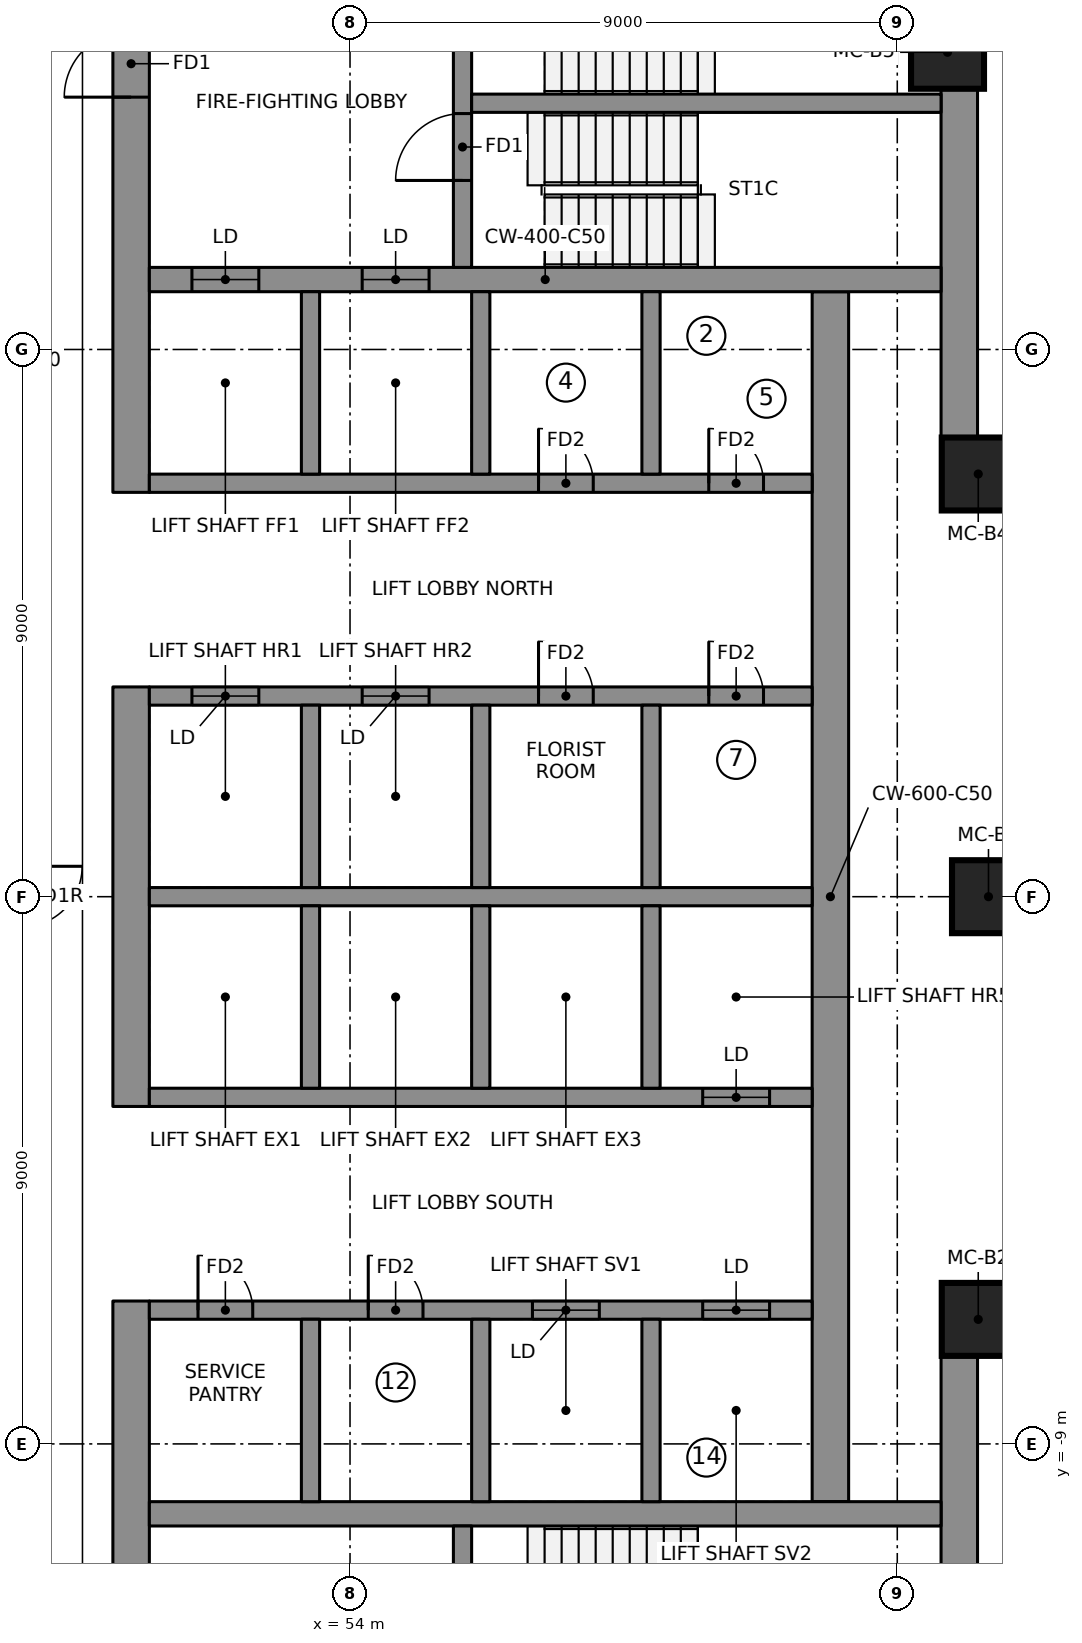
"""IFC4 building model, lengths in metres.
Left out: names, types, materials, properties, quantities, classifications, styles, units other than length and angle.
Written with IfcOpenShell. Run it as: python <this file> out.ifc"""

import sys

from ifc_helpers import new_model, si_unit, direction, frame, frame_2d, origin, origin_2d, place, context, subcontext, project, spatial, rectangle, extrude, element, fill, save


model = new_model("IFC4")
c1 = context("Model", 3, precision=1e-05, world=origin(), true_north=direction((0.0, 1.0)))
c2 = subcontext(c1, "Body", "Model", "MODEL_VIEW")
j1 = project(units=[si_unit("LENGTHUNIT", "METRE"), si_unit("PLANEANGLEUNIT", "RADIAN")], contexts=[c1])
p1 = place(None, origin())
s1 = spatial("IfcSite", under=j1, at=p1, CompositionType="ELEMENT")
p2 = place(p1, origin())
s2 = spatial("IfcBuilding", under=s1, at=p2, CompositionType="ELEMENT")
p3 = place(p2, frame((0.0, 0.0, 242.1)))
s3 = spatial("IfcBuildingStorey", under=s2, at=p3, CompositionType="ELEMENT", Elevation=242.1)
p4 = place(p3, frame((50.4, 6.65, 0.0), z_axis=(0.0, 0.0, 1.0), x_axis=(0.0, 1.0, 0.0)))
e1 = element("IfcWall", 1, at=p4, inside=s3, PredefinedType="SHEAR", context=c2, shape_type="SweptSolid", body=[
    extrude(rectangle(XDim=9.7, YDim=0.6, at=frame_2d((4.85, 0.0))), origin(), (0.0, 0.0, 1.0), 3.55),
])
p5 = place(p4, frame((6.5, 0.0, 0.0)))
e2 = element("IfcOpeningElement", 2, at=p5, cuts=e1, PredefinedType="OPENING", context=c2, shape_type="SweptSolid", body=[
    extrude(rectangle(XDim=1.1, YDim=2.1, at=frame_2d((0.55, 1.05))), frame((0.0, 0.31, 0.0), z_axis=(0.0, -1.0, 0.0), x_axis=(1.0, 0.0, 0.0)), (0.0, 0.0, 1.0), 0.62),
])
p6 = place(p3, frame((50.4, -3.45, 0.0), z_axis=(0.0, 0.0, 1.0), x_axis=(0.0, 1.0, 0.0)))
e3 = element("IfcWall", 3, at=p6, inside=s3, PredefinedType="SHEAR", context=c2, shape_type="SweptSolid", body=[
    extrude(rectangle(XDim=6.9, YDim=0.6, at=frame_2d((3.45, 0.0))), origin(), (0.0, 0.0, 1.0), 3.55),
])
p7 = place(p3, frame((50.4, -16.35, 0.0), z_axis=(0.0, 0.0, 1.0), x_axis=(0.0, 1.0, 0.0)))
e4 = element("IfcWall", 4, at=p7, inside=s3, PredefinedType="SHEAR", context=c2, shape_type="SweptSolid", body=[
    extrude(rectangle(XDim=9.7, YDim=0.6, at=frame_2d((4.85, 0.0))), origin(), (0.0, 0.0, 1.0), 3.55),
])
p8 = place(p7, frame((2.1, 0.0, 0.0)))
e5 = element("IfcOpeningElement", 5, at=p8, cuts=e4, PredefinedType="OPENING", context=c2, shape_type="SweptSolid", body=[
    extrude(rectangle(XDim=1.1, YDim=2.1, at=frame_2d((0.55, 1.05))), frame((0.0, 0.31, 0.0), z_axis=(0.0, -1.0, 0.0), x_axis=(1.0, 0.0, 0.0)), (0.0, 0.0, 1.0), 0.62),
])
for number, where, z_axis, x_axis in (
    (6, (64.02, 7.502, 0.0), (0.0, 0.0, 1.0), (0.0, 1.0, 0.0)),
    (7, (64.02, -15.75, 0.0), (0.0, 0.0, 1.0), (0.0, 1.0, 0.0)),
):
    element("IfcWall", number, at=place(p3, frame(where, z_axis=z_axis, x_axis=x_axis)), inside=s3, PredefinedType="SHEAR", context=c2, shape_type="SweptSolid", body=[
        extrude(rectangle(XDim=8.248, YDim=0.6, at=frame_2d((4.124, 0.0))), origin(), (0.0, 0.0, 1.0), 3.55),
    ])
p9 = place(p3, frame((61.9, -9.95, 0.0), z_axis=(0.0, 0.0, 1.0), x_axis=(0.0, 1.0, 0.0)))
e8 = element("IfcWall", 8, at=p9, inside=s3, PredefinedType="SHEAR", context=c2, shape_type="SweptSolid", body=[
    extrude(rectangle(XDim=19.9, YDim=0.6, at=frame_2d((9.95, 0.0))), origin(), (0.0, 0.0, 1.0), 3.55),
])
p10 = place(p3, frame((50.7, 10.15, 0.0), z_axis=(0.0, 0.0, 1.0), x_axis=(1.0, 0.0, 0.0)))
e9 = element("IfcWall", 9, at=p10, inside=s3, PredefinedType="SHEAR", context=c2, shape_type="SweptSolid", body=[
    extrude(rectangle(XDim=13.02, YDim=0.4, at=frame_2d((6.51, 0.0))), origin(), (0.0, 0.0, 1.0), 3.55),
])
p11 = place(p10, frame((0.7, 0.0, 0.0)))
e10 = element("IfcOpeningElement", 10, at=p11, cuts=e9, PredefinedType="OPENING", context=c2, shape_type="SweptSolid", body=[
    extrude(rectangle(XDim=1.1, YDim=2.1, at=frame_2d((0.55, 1.05))), frame((0.0, 0.21, 0.0), z_axis=(0.0, -1.0, 0.0), x_axis=(1.0, 0.0, 0.0)), (0.0, 0.0, 1.0), 0.42),
])
p12 = place(p10, frame((3.5, 0.0, 0.0)))
e11 = element("IfcOpeningElement", 11, at=p12, cuts=e9, PredefinedType="OPENING", context=c2, shape_type="SweptSolid", body=[
    extrude(rectangle(XDim=1.1, YDim=2.1, at=frame_2d((0.55, 1.05))), frame((0.0, 0.21, 0.0), z_axis=(0.0, -1.0, 0.0), x_axis=(1.0, 0.0, 0.0)), (0.0, 0.0, 1.0), 0.42),
])
p13 = place(p3, frame((50.7, -10.15, 0.0), z_axis=(0.0, 0.0, 1.0), x_axis=(1.0, 0.0, 0.0)))
e12 = element("IfcWall", 12, at=p13, inside=s3, PredefinedType="SHEAR", context=c2, shape_type="SweptSolid", body=[
    extrude(rectangle(XDim=13.02, YDim=0.4, at=frame_2d((6.51, 0.0))), origin(), (0.0, 0.0, 1.0), 3.55),
])
p14 = place(p3, frame((50.7, 0.0, 0.0), z_axis=(0.0, 0.0, 1.0), x_axis=(1.0, 0.0, 0.0)))
e13 = element("IfcWall", 13, at=p14, inside=s3, PredefinedType="SHEAR", context=c2, shape_type="SweptSolid", body=[
    extrude(rectangle(XDim=10.9, YDim=0.3, at=frame_2d((5.45, 0.0))), origin(), (0.0, 0.0, 1.0), 3.55),
])
p15 = place(p3, frame((50.7, 3.3, 0.0), z_axis=(0.0, 0.0, 1.0), x_axis=(1.0, 0.0, 0.0)))
e14 = element("IfcWall", 14, at=p15, inside=s3, PredefinedType="SHEAR", context=c2, shape_type="SweptSolid", body=[
    extrude(rectangle(XDim=10.9, YDim=0.3, at=frame_2d((5.45, 0.0))), origin(), (0.0, 0.0, 1.0), 3.55),
])
p16 = place(p15, frame((0.7, 0.0, 0.0)))
e15 = element("IfcOpeningElement", 15, at=p16, cuts=e14, PredefinedType="OPENING", context=c2, shape_type="SweptSolid", body=[
    extrude(rectangle(XDim=1.1, YDim=2.1, at=frame_2d((0.55, 1.05))), frame((0.0, 0.16, 0.0), z_axis=(0.0, -1.0, 0.0), x_axis=(1.0, 0.0, 0.0)), (0.0, 0.0, 1.0), 0.32),
])
p17 = place(p15, frame((3.5, 0.0, 0.0)))
e16 = element("IfcOpeningElement", 16, at=p17, cuts=e14, PredefinedType="OPENING", context=c2, shape_type="SweptSolid", body=[
    extrude(rectangle(XDim=1.1, YDim=2.1, at=frame_2d((0.55, 1.05))), frame((0.0, 0.16, 0.0), z_axis=(0.0, -1.0, 0.0), x_axis=(1.0, 0.0, 0.0)), (0.0, 0.0, 1.0), 0.32),
])
p18 = place(p15, frame((6.4, 0.0, 0.0)))
e17 = element("IfcOpeningElement", 17, at=p18, cuts=e14, PredefinedType="OPENING", context=c2, shape_type="SweptSolid", body=[
    extrude(rectangle(XDim=0.9, YDim=2.1, at=frame_2d((0.45, 1.05))), frame((0.0, 0.16, 0.0), z_axis=(0.0, -1.0, 0.0), x_axis=(1.0, 0.0, 0.0)), (0.0, 0.0, 1.0), 0.32),
])
p19 = place(p15, frame((9.2, 0.0, 0.0)))
e18 = element("IfcOpeningElement", 18, at=p19, cuts=e14, PredefinedType="OPENING", context=c2, shape_type="SweptSolid", body=[
    extrude(rectangle(XDim=0.9, YDim=2.1, at=frame_2d((0.45, 1.05))), frame((0.0, 0.16, 0.0), z_axis=(0.0, -1.0, 0.0), x_axis=(1.0, 0.0, 0.0)), (0.0, 0.0, 1.0), 0.32),
])
p20 = place(p3, frame((50.7, 6.8, 0.0), z_axis=(0.0, 0.0, 1.0), x_axis=(1.0, 0.0, 0.0)))
e19 = element("IfcWall", 19, at=p20, inside=s3, PredefinedType="SHEAR", context=c2, shape_type="SweptSolid", body=[
    extrude(rectangle(XDim=10.9, YDim=0.3, at=frame_2d((5.45, 0.0))), origin(), (0.0, 0.0, 1.0), 3.55),
])
p21 = place(p20, frame((6.4, 0.0, 0.0)))
e20 = element("IfcOpeningElement", 20, at=p21, cuts=e19, PredefinedType="OPENING", context=c2, shape_type="SweptSolid", body=[
    extrude(rectangle(XDim=0.9, YDim=2.1, at=frame_2d((0.45, 1.05))), frame((0.0, 0.16, 0.0), z_axis=(0.0, -1.0, 0.0), x_axis=(1.0, 0.0, 0.0)), (0.0, 0.0, 1.0), 0.32),
])
p22 = place(p20, frame((9.2, 0.0, 0.0)))
e21 = element("IfcOpeningElement", 21, at=p22, cuts=e19, PredefinedType="OPENING", context=c2, shape_type="SweptSolid", body=[
    extrude(rectangle(XDim=0.9, YDim=2.1, at=frame_2d((0.45, 1.05))), frame((0.0, 0.16, 0.0), z_axis=(0.0, -1.0, 0.0), x_axis=(1.0, 0.0, 0.0)), (0.0, 0.0, 1.0), 0.32),
])
for number, where, z_axis, x_axis in (
    (22, (53.35, 0.15, 0.0), (0.0, 0.0, 1.0), (0.0, 1.0, 0.0)),
    (23, (53.35, 6.95, 0.0), (0.0, 0.0, 1.0), (0.0, 1.0, 0.0)),
    (24, (56.15, 0.15, 0.0), (0.0, 0.0, 1.0), (0.0, 1.0, 0.0)),
    (25, (56.15, 6.95, 0.0), (0.0, 0.0, 1.0), (0.0, 1.0, 0.0)),
    (26, (58.95, 0.15, 0.0), (0.0, 0.0, 1.0), (0.0, 1.0, 0.0)),
    (27, (58.95, 6.95, 0.0), (0.0, 0.0, 1.0), (0.0, 1.0, 0.0)),
):
    element("IfcWall", number, at=place(p3, frame(where, z_axis=z_axis, x_axis=x_axis)), inside=s3, PredefinedType="SHEAR", context=c2, shape_type="SweptSolid", body=[
        extrude(rectangle(XDim=3.0, YDim=0.3, at=frame_2d((1.5, 0.0))), origin(), (0.0, 0.0, 1.0), 3.55),
    ])
p23 = place(p3, frame((50.7, -3.3, 0.0), z_axis=(0.0, 0.0, 1.0), x_axis=(1.0, 0.0, 0.0)))
e28 = element("IfcWall", 28, at=p23, inside=s3, PredefinedType="SHEAR", context=c2, shape_type="SweptSolid", body=[
    extrude(rectangle(XDim=10.9, YDim=0.3, at=frame_2d((5.45, 0.0))), origin(), (0.0, 0.0, 1.0), 3.55),
])
p24 = place(p23, frame((9.1, 0.0, 0.0)))
e29 = element("IfcOpeningElement", 29, at=p24, cuts=e28, PredefinedType="OPENING", context=c2, shape_type="SweptSolid", body=[
    extrude(rectangle(XDim=1.1, YDim=2.1, at=frame_2d((0.55, 1.05))), frame((0.0, 0.16, 0.0), z_axis=(0.0, -1.0, 0.0), x_axis=(1.0, 0.0, 0.0)), (0.0, 0.0, 1.0), 0.32),
])
p25 = place(p3, frame((50.7, -6.8, 0.0), z_axis=(0.0, 0.0, 1.0), x_axis=(1.0, 0.0, 0.0)))
e30 = element("IfcWall", 30, at=p25, inside=s3, PredefinedType="SHEAR", context=c2, shape_type="SweptSolid", body=[
    extrude(rectangle(XDim=10.9, YDim=0.3, at=frame_2d((5.45, 0.0))), origin(), (0.0, 0.0, 1.0), 3.55),
])
p26 = place(p25, frame((6.3, 0.0, 0.0)))
e31 = element("IfcOpeningElement", 31, at=p26, cuts=e30, PredefinedType="OPENING", context=c2, shape_type="SweptSolid", body=[
    extrude(rectangle(XDim=1.1, YDim=2.1, at=frame_2d((0.55, 1.05))), frame((0.0, 0.16, 0.0), z_axis=(0.0, -1.0, 0.0), x_axis=(1.0, 0.0, 0.0)), (0.0, 0.0, 1.0), 0.32),
])
p27 = place(p25, frame((9.1, 0.0, 0.0)))
e32 = element("IfcOpeningElement", 32, at=p27, cuts=e30, PredefinedType="OPENING", context=c2, shape_type="SweptSolid", body=[
    extrude(rectangle(XDim=1.1, YDim=2.1, at=frame_2d((0.55, 1.05))), frame((0.0, 0.16, 0.0), z_axis=(0.0, -1.0, 0.0), x_axis=(1.0, 0.0, 0.0)), (0.0, 0.0, 1.0), 0.32),
])
p28 = place(p25, frame((0.8, 0.0, 0.0)))
e33 = element("IfcOpeningElement", 33, at=p28, cuts=e30, PredefinedType="OPENING", context=c2, shape_type="SweptSolid", body=[
    extrude(rectangle(XDim=0.9, YDim=2.1, at=frame_2d((0.45, 1.05))), frame((0.0, 0.16, 0.0), z_axis=(0.0, -1.0, 0.0), x_axis=(1.0, 0.0, 0.0)), (0.0, 0.0, 1.0), 0.32),
])
p29 = place(p25, frame((3.6, 0.0, 0.0)))
e34 = element("IfcOpeningElement", 34, at=p29, cuts=e30, PredefinedType="OPENING", context=c2, shape_type="SweptSolid", body=[
    extrude(rectangle(XDim=0.9, YDim=2.1, at=frame_2d((0.45, 1.05))), frame((0.0, 0.16, 0.0), z_axis=(0.0, -1.0, 0.0), x_axis=(1.0, 0.0, 0.0)), (0.0, 0.0, 1.0), 0.32),
])
for number, where, z_axis, x_axis in (
    (35, (53.35, -3.15, 0.0), (0.0, 0.0, 1.0), (0.0, 1.0, 0.0)),
    (36, (53.35, -9.95, 0.0), (0.0, 0.0, 1.0), (0.0, 1.0, 0.0)),
    (37, (56.15, -3.15, 0.0), (0.0, 0.0, 1.0), (0.0, 1.0, 0.0)),
    (38, (56.15, -9.95, 0.0), (0.0, 0.0, 1.0), (0.0, 1.0, 0.0)),
    (39, (58.95, -3.15, 0.0), (0.0, 0.0, 1.0), (0.0, 1.0, 0.0)),
    (40, (58.95, -9.95, 0.0), (0.0, 0.0, 1.0), (0.0, 1.0, 0.0)),
):
    element("IfcWall", number, at=place(p3, frame(where, z_axis=z_axis, x_axis=x_axis)), inside=s3, PredefinedType="SHEAR", context=c2, shape_type="SweptSolid", body=[
        extrude(rectangle(XDim=3.0, YDim=0.3, at=frame_2d((1.5, 0.0))), origin(), (0.0, 0.0, 1.0), 3.55),
    ])
p30 = place(p3, frame((55.85, 10.35, 0.0), z_axis=(0.0, 0.0, 1.0), x_axis=(0.0, 1.0, 0.0)))
e41 = element("IfcWall", 41, at=p30, inside=s3, PredefinedType="SHEAR", context=c2, shape_type="SweptSolid", body=[
    extrude(rectangle(XDim=5.4, YDim=0.3, at=frame_2d((2.7, 0.0))), origin(), (0.0, 0.0, 1.0), 3.55),
])
p31 = place(p30, frame((1.43, 0.0, 0.0)))
e42 = element("IfcOpeningElement", 42, at=p31, cuts=e41, PredefinedType="OPENING", context=c2, shape_type="SweptSolid", body=[
    extrude(rectangle(XDim=1.1, YDim=2.1, at=frame_2d((0.55, 1.05))), frame((0.0, 0.16, 0.0), z_axis=(0.0, -1.0, 0.0), x_axis=(1.0, 0.0, 0.0)), (0.0, 0.0, 1.0), 0.32),
])
p32 = place(p30, frame((3.6, 0.0, 0.0)))
e43 = element("IfcOpeningElement", 43, at=p32, cuts=e41, PredefinedType="OPENING", context=c2, shape_type="SweptSolid", body=[
    extrude(rectangle(XDim=1.1, YDim=2.1, at=frame_2d((0.55, 1.05))), frame((0.0, 0.16, 0.0), z_axis=(0.0, -1.0, 0.0), x_axis=(1.0, 0.0, 0.0)), (0.0, 0.0, 1.0), 0.32),
])
p33 = place(p3, frame((55.85, -15.75, 0.0), z_axis=(0.0, 0.0, 1.0), x_axis=(0.0, 1.0, 0.0)))
e44 = element("IfcWall", 44, at=p33, inside=s3, PredefinedType="SHEAR", context=c2, shape_type="SweptSolid", body=[
    extrude(rectangle(XDim=5.4, YDim=0.3, at=frame_2d((2.7, 0.0))), origin(), (0.0, 0.0, 1.0), 3.55),
])
p34 = place(p33, frame((3.6, 0.0, 0.0)))
e45 = element("IfcOpeningElement", 45, at=p34, cuts=e44, PredefinedType="OPENING", context=c2, shape_type="SweptSolid", body=[
    extrude(rectangle(XDim=1.1, YDim=2.1, at=frame_2d((0.55, 1.05))), frame((0.0, 0.16, 0.0), z_axis=(0.0, -1.0, 0.0), x_axis=(1.0, 0.0, 0.0)), (0.0, 0.0, 1.0), 0.32),
])
p35 = place(p33, frame((0.8, 0.0, 0.0)))
e46 = element("IfcOpeningElement", 46, at=p35, cuts=e44, PredefinedType="OPENING", context=c2, shape_type="SweptSolid", body=[
    extrude(rectangle(XDim=0.9, YDim=2.1, at=frame_2d((0.45, 1.05))), frame((0.0, 0.16, 0.0), z_axis=(0.0, -1.0, 0.0), x_axis=(1.0, 0.0, 0.0)), (0.0, 0.0, 1.0), 0.32),
])
p36 = place(p3, frame((56.0, 13.05, 0.0), z_axis=(0.0, 0.0, 1.0), x_axis=(1.0, 0.0, 0.0)))
e47 = element("IfcWall", 47, at=p36, inside=s3, PredefinedType="SHEAR", context=c2, shape_type="SweptSolid", body=[
    extrude(rectangle(XDim=7.72, YDim=0.3, at=frame_2d((3.86, 0.0))), origin(), (0.0, 0.0, 1.0), 3.55),
])
for number, where, z_axis, x_axis in (
    (48, (64.332, -6.952, 0.0), (0.0, 0.0, 1.0), (1.0, 0.0, 0.0)),
    (49, (64.5, 0.0, 0.0), (0.0, 0.0, 1.0), (1.0, 0.0, 0.0)),
    (50, (64.332, 6.952, 0.0), (0.0, 0.0, 1.0), (1.0, 0.0, 0.0)),
    (51, (63.826, 13.888, 0.0), (0.0, 0.0, 1.0), (1.0, 0.0, 0.0)),
):
    element("IfcColumn", number, at=place(p3, frame(where, z_axis=z_axis, x_axis=x_axis)), inside=s3, PredefinedType="COLUMN", context=c2, shape_type="SweptSolid", body=[
        extrude(rectangle(XDim=1.2, YDim=1.2, at=origin_2d()), origin(), (0.0, 0.0, 1.0), 3.55),
    ])
p37 = place(p11, origin())
e52 = element("IfcDoor", 52, at=p37, inside=s3, OperationType="DOUBLE_DOOR_SLIDING", PredefinedType="DOOR", context=c2, shape_type="SweptSolid", body=[
    extrude(rectangle(XDim=1.1, YDim=2.1, at=frame_2d((0.55, 1.05))), frame((0.0, 0.025, 0.0), z_axis=(0.0, -1.0, 0.0), x_axis=(1.0, 0.0, 0.0)), (0.0, 0.0, 1.0), 0.05),
])
fill(e10, e52)
p38 = place(p12, origin())
e53 = element("IfcDoor", 53, at=p38, inside=s3, OperationType="DOUBLE_DOOR_SLIDING", PredefinedType="DOOR", context=c2, shape_type="SweptSolid", body=[
    extrude(rectangle(XDim=1.1, YDim=2.1, at=frame_2d((0.55, 1.05))), frame((0.0, 0.025, 0.0), z_axis=(0.0, -1.0, 0.0), x_axis=(1.0, 0.0, 0.0)), (0.0, 0.0, 1.0), 0.05),
])
fill(e11, e53)
p39 = place(p16, origin())
e54 = element("IfcDoor", 54, at=p39, inside=s3, OperationType="DOUBLE_DOOR_SLIDING", PredefinedType="DOOR", context=c2, shape_type="SweptSolid", body=[
    extrude(rectangle(XDim=1.1, YDim=2.1, at=frame_2d((0.55, 1.05))), frame((0.0, 0.025, 0.0), z_axis=(0.0, -1.0, 0.0), x_axis=(1.0, 0.0, 0.0)), (0.0, 0.0, 1.0), 0.05),
])
fill(e15, e54)
p40 = place(p17, origin())
e55 = element("IfcDoor", 55, at=p40, inside=s3, OperationType="DOUBLE_DOOR_SLIDING", PredefinedType="DOOR", context=c2, shape_type="SweptSolid", body=[
    extrude(rectangle(XDim=1.1, YDim=2.1, at=frame_2d((0.55, 1.05))), frame((0.0, 0.025, 0.0), z_axis=(0.0, -1.0, 0.0), x_axis=(1.0, 0.0, 0.0)), (0.0, 0.0, 1.0), 0.05),
])
fill(e16, e55)
p41 = place(p24, origin())
e56 = element("IfcDoor", 56, at=p41, inside=s3, OperationType="DOUBLE_DOOR_SLIDING", PredefinedType="DOOR", context=c2, shape_type="SweptSolid", body=[
    extrude(rectangle(XDim=1.1, YDim=2.1, at=frame_2d((0.55, 1.05))), frame((0.0, 0.025, 0.0), z_axis=(0.0, -1.0, 0.0), x_axis=(1.0, 0.0, 0.0)), (0.0, 0.0, 1.0), 0.05),
])
fill(e29, e56)
p42 = place(p26, origin())
e57 = element("IfcDoor", 57, at=p42, inside=s3, OperationType="DOUBLE_DOOR_SLIDING", PredefinedType="DOOR", context=c2, shape_type="SweptSolid", body=[
    extrude(rectangle(XDim=1.1, YDim=2.1, at=frame_2d((0.55, 1.05))), frame((0.0, 0.025, 0.0), z_axis=(0.0, -1.0, 0.0), x_axis=(1.0, 0.0, 0.0)), (0.0, 0.0, 1.0), 0.05),
])
fill(e31, e57)
p43 = place(p27, origin())
e58 = element("IfcDoor", 58, at=p43, inside=s3, OperationType="DOUBLE_DOOR_SLIDING", PredefinedType="DOOR", context=c2, shape_type="SweptSolid", body=[
    extrude(rectangle(XDim=1.1, YDim=2.1, at=frame_2d((0.55, 1.05))), frame((0.0, 0.025, 0.0), z_axis=(0.0, -1.0, 0.0), x_axis=(1.0, 0.0, 0.0)), (0.0, 0.0, 1.0), 0.05),
])
fill(e32, e58)
p44 = place(p31, origin())
e59 = element("IfcDoor", 59, at=p44, inside=s3, OperationType="SINGLE_SWING_RIGHT", PredefinedType="DOOR", context=c2, shape_type="SweptSolid", body=[
    extrude(rectangle(XDim=1.1, YDim=2.1, at=frame_2d((0.55, 1.05))), frame((0.0, 0.025, 0.0), z_axis=(0.0, -1.0, 0.0), x_axis=(1.0, 0.0, 0.0)), (0.0, 0.0, 1.0), 0.05),
])
fill(e42, e59)
p45 = place(p5, origin())
e60 = element("IfcDoor", 60, at=p45, inside=s3, OperationType="SINGLE_SWING_RIGHT", PredefinedType="DOOR", context=c2, shape_type="SweptSolid", body=[
    extrude(rectangle(XDim=1.1, YDim=2.1, at=frame_2d((0.55, 1.05))), frame((0.0, 0.025, 0.0), z_axis=(0.0, -1.0, 0.0), x_axis=(1.0, 0.0, 0.0)), (0.0, 0.0, 1.0), 0.05),
])
fill(e2, e60)
p46 = place(p21, origin())
e61 = element("IfcDoor", 61, at=p46, inside=s3, OperationType="SINGLE_SWING_LEFT", PredefinedType="DOOR", context=c2, shape_type="SweptSolid", body=[
    extrude(rectangle(XDim=0.9, YDim=2.1, at=frame_2d((0.45, 1.05))), frame((0.0, 0.025, 0.0), z_axis=(0.0, -1.0, 0.0), x_axis=(1.0, 0.0, 0.0)), (0.0, 0.0, 1.0), 0.05),
])
fill(e20, e61)
p47 = place(p22, origin())
e62 = element("IfcDoor", 62, at=p47, inside=s3, OperationType="SINGLE_SWING_LEFT", PredefinedType="DOOR", context=c2, shape_type="SweptSolid", body=[
    extrude(rectangle(XDim=0.9, YDim=2.1, at=frame_2d((0.45, 1.05))), frame((0.0, 0.025, 0.0), z_axis=(0.0, -1.0, 0.0), x_axis=(1.0, 0.0, 0.0)), (0.0, 0.0, 1.0), 0.05),
])
fill(e21, e62)
p48 = place(p18, origin())
e63 = element("IfcDoor", 63, at=p48, inside=s3, OperationType="SINGLE_SWING_LEFT", PredefinedType="DOOR", context=c2, shape_type="SweptSolid", body=[
    extrude(rectangle(XDim=0.9, YDim=2.1, at=frame_2d((0.45, 1.05))), frame((0.0, 0.025, 0.0), z_axis=(0.0, -1.0, 0.0), x_axis=(1.0, 0.0, 0.0)), (0.0, 0.0, 1.0), 0.05),
])
fill(e17, e63)
p49 = place(p19, origin())
e64 = element("IfcDoor", 64, at=p49, inside=s3, OperationType="SINGLE_SWING_LEFT", PredefinedType="DOOR", context=c2, shape_type="SweptSolid", body=[
    extrude(rectangle(XDim=0.9, YDim=2.1, at=frame_2d((0.45, 1.05))), frame((0.0, 0.025, 0.0), z_axis=(0.0, -1.0, 0.0), x_axis=(1.0, 0.0, 0.0)), (0.0, 0.0, 1.0), 0.05),
])
fill(e18, e64)
p50 = place(p28, origin())
e65 = element("IfcDoor", 65, at=p50, inside=s3, OperationType="SINGLE_SWING_LEFT", PredefinedType="DOOR", context=c2, shape_type="SweptSolid", body=[
    extrude(rectangle(XDim=0.9, YDim=2.1, at=frame_2d((0.45, 1.05))), frame((0.0, 0.025, 0.0), z_axis=(0.0, -1.0, 0.0), x_axis=(1.0, 0.0, 0.0)), (0.0, 0.0, 1.0), 0.05),
])
fill(e33, e65)
p51 = place(p29, origin())
e66 = element("IfcDoor", 66, at=p51, inside=s3, OperationType="SINGLE_SWING_LEFT", PredefinedType="DOOR", context=c2, shape_type="SweptSolid", body=[
    extrude(rectangle(XDim=0.9, YDim=2.1, at=frame_2d((0.45, 1.05))), frame((0.0, 0.025, 0.0), z_axis=(0.0, -1.0, 0.0), x_axis=(1.0, 0.0, 0.0)), (0.0, 0.0, 1.0), 0.05),
])
fill(e34, e66)
save(model, sys.argv[1])
